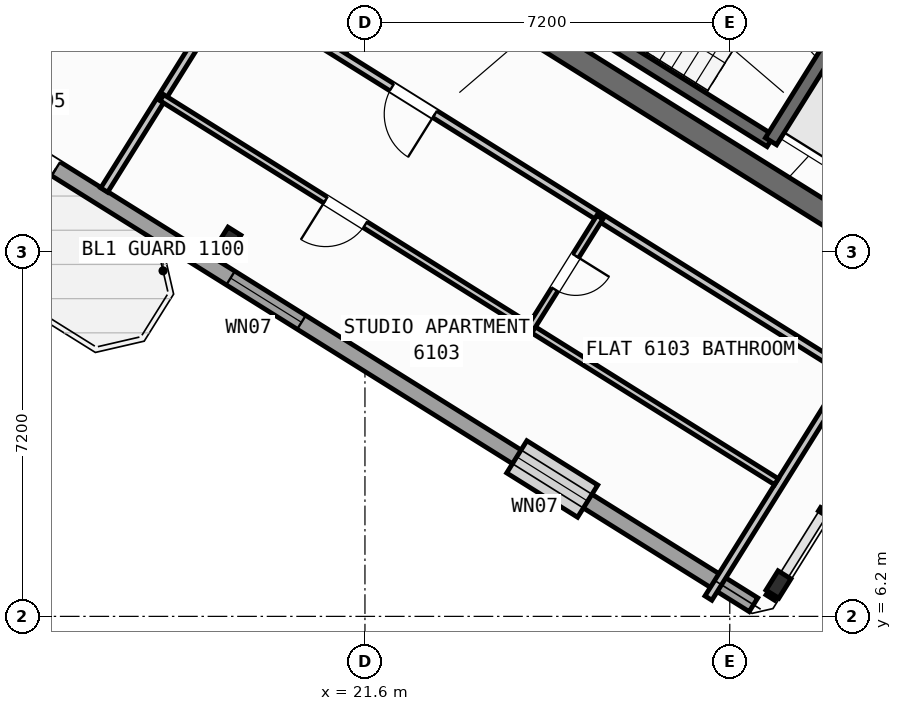
"""IFC4 building model, lengths in metres.
Left out: names, types, materials, properties, quantities, classifications, styles, units other than length and angle.
Written with IfcOpenShell. Run it as: python <this file> out.ifc"""

import sys

from ifc_helpers import new_model, si_unit, direction, frame, frame_2d, origin, origin_2d, place, context, subcontext, project, spatial, rectangle, i_section, extrude, source, transform, mapped, element, fill, save


model = new_model("IFC4")
c1 = context("Model", 3, precision=1e-05, world=origin(), true_north=direction((0.0, 1.0)))
c2 = subcontext(c1, "Body", "Model", "MODEL_VIEW")
j1 = project(units=[si_unit("LENGTHUNIT", "METRE"), si_unit("PLANEANGLEUNIT", "RADIAN")], contexts=[c1])
p1 = place(None, origin())
s1 = spatial("IfcSite", under=j1, at=p1, CompositionType="ELEMENT")
p2 = place(p1, origin())
s2 = spatial("IfcBuilding", under=s1, at=p2, CompositionType="ELEMENT")
p3 = place(p2, frame((0.0, 0.0, 242.1)))
s3 = spatial("IfcBuildingStorey", under=s2, at=p3, CompositionType="ELEMENT", Elevation=242.1)
p4 = place(p3, frame((33.324, 12.503, 0.0), z_axis=(0.0, 0.0, 1.0), x_axis=(-0.848043529849, 0.529926571782, 0.0)))
e1 = element("IfcWall", 1, at=p4, inside=s3, PredefinedType="SHEAR", context=c2, shape_type="SweptSolid", body=[
    extrude(rectangle(XDim=13.04, YDim=0.45, at=frame_2d((6.52, 0.0))), origin(), (0.0, 0.0, 1.0), 3.32),
])
m1 = source(origin(), c2, "Body", "SweptSolid", [
    extrude(i_section(OverallWidth=0.3, OverallDepth=0.45, WebThickness=0.014, FlangeThickness=0.026, at=origin_2d()), origin(), (0.0, 0.0, 1.0), 3.6),
])
for number, where, z_axis, x_axis in (
    (2, (29.761, 6.829, 0.0), (0.0, 0.0, 1.0), (-0.848, 0.53, 0.0)),
    (3, (18.906, 13.612, 0.0), (0.0, 0.0, 1.0), (-0.848, 0.53, 0.0)),
):
    element("IfcColumn", number, at=place(p3, frame(where, z_axis=z_axis, x_axis=x_axis)), inside=s3, PredefinedType="COLUMN", context=c2, shape_type="MappedRepresentation", body=[
        mapped(m1, transform((0.0, 0.0, 0.0), scale=1.0)),
    ])
p5 = place(p3, frame((29.268, 6.429, 0.0), z_axis=(0.0, 0.0, 1.0), x_axis=(-0.848049971435, 0.529916263149, 0.0)))
e4 = element("IfcWall", 4, at=p5, inside=s3, PredefinedType="STANDARD", context=c2, shape_type="SweptSolid", body=[
    extrude(rectangle(XDim=31.588, YDim=0.32, at=frame_2d((15.794, 0.0))), origin(), (0.0, 0.0, 1.0), 3.32),
])
p6 = place(p5, frame((16.235, 0.0, 0.0)))
e5 = element("IfcOpeningElement", 5, at=p6, cuts=e4, PredefinedType="OPENING", context=c2, shape_type="SweptSolid", body=[
    extrude(rectangle(XDim=1.2, YDim=2.15, at=frame_2d((0.6, 1.075))), frame((0.0, 0.17, 0.0), z_axis=(0.0, -1.0, 0.0), x_axis=(1.0, 0.0, 0.0)), (0.0, 0.0, 1.0), 0.34),
])
p7 = place(p5, frame((3.859, 0.0, 0.9)))
e6 = element("IfcOpeningElement", 6, at=p7, cuts=e4, PredefinedType="OPENING", context=c2, shape_type="SweptSolid", body=[
    extrude(rectangle(XDim=1.65, YDim=1.45, at=frame_2d((0.825, 0.725))), frame((0.0, 0.17, 0.0), z_axis=(0.0, -1.0, 0.0), x_axis=(1.0, 0.0, 0.0)), (0.0, 0.0, 1.0), 0.34),
])
p8 = place(p5, frame((10.519, 0.0, 0.9)))
e7 = element("IfcOpeningElement", 7, at=p8, cuts=e4, PredefinedType="OPENING", context=c2, shape_type="SweptSolid", body=[
    extrude(rectangle(XDim=1.65, YDim=1.45, at=frame_2d((0.825, 0.725))), frame((0.0, 0.17, 0.0), z_axis=(0.0, -1.0, 0.0), x_axis=(1.0, 0.0, 0.0)), (0.0, 0.0, 1.0), 0.34),
])
p9 = place(p5, frame((19.182, 0.0, 1.0)))
e8 = element("IfcOpeningElement", 8, at=p9, cuts=e4, PredefinedType="OPENING", context=c2, shape_type="SweptSolid", body=[
    extrude(rectangle(XDim=0.9, YDim=1.25, at=frame_2d((0.45, 0.625))), frame((0.0, 0.17, 0.0), z_axis=(0.0, -1.0, 0.0), x_axis=(1.0, 0.0, 0.0)), (0.0, 0.0, 1.0), 0.34),
])
p10 = place(p5, frame((22.524, 0.0, 1.0)))
e9 = element("IfcOpeningElement", 9, at=p10, cuts=e4, PredefinedType="OPENING", context=c2, shape_type="SweptSolid", body=[
    extrude(rectangle(XDim=0.9, YDim=1.25, at=frame_2d((0.45, 0.625))), frame((0.0, 0.17, 0.0), z_axis=(0.0, -1.0, 0.0), x_axis=(1.0, 0.0, 0.0)), (0.0, 0.0, 1.0), 0.34),
])
p11 = place(p5, frame((25.658, 0.0, 0.9)))
e10 = element("IfcOpeningElement", 10, at=p11, cuts=e4, PredefinedType="OPENING", context=c2, shape_type="SweptSolid", body=[
    extrude(rectangle(XDim=1.65, YDim=1.45, at=frame_2d((0.825, 0.725))), frame((0.0, 0.17, 0.0), z_axis=(0.0, -1.0, 0.0), x_axis=(1.0, 0.0, 0.0)), (0.0, 0.0, 1.0), 0.34),
])
p12 = place(p5, frame((29.278, 0.0, 0.9)))
e11 = element("IfcOpeningElement", 11, at=p12, cuts=e4, PredefinedType="OPENING", context=c2, shape_type="SweptSolid", body=[
    extrude(rectangle(XDim=1.35, YDim=1.45, at=frame_2d((0.675, 0.725))), frame((0.0, 0.17, 0.0), z_axis=(0.0, -1.0, 0.0), x_axis=(1.0, 0.0, 0.0)), (0.0, 0.0, 1.0), 0.34),
])
p13 = place(p3, frame((29.605, 15.581, 0.0), z_axis=(0.0, 0.0, 1.0), x_axis=(-0.848036911448, 0.529937163087, 0.0)))
e12 = element("IfcWall", 12, at=p13, inside=s3, PredefinedType="SHEAR", context=c2, shape_type="SweptSolid", body=[
    extrude(rectangle(XDim=7.46, YDim=0.26, at=frame_2d((3.73, 0.0))), origin(), (0.0, 0.0, 1.0), 3.32),
])
p14 = place(p3, frame((31.288, 18.256, 0.0), z_axis=(0.0, 0.0, 1.0), x_axis=(-0.529943379326, -0.848033026897, 0.0)))
e13 = element("IfcWall", 13, at=p14, inside=s3, PredefinedType="SHEAR", context=c2, shape_type="SweptSolid", body=[
    extrude(rectangle(XDim=3.16, YDim=0.26, at=frame_2d((1.58, 0.0))), origin(), (0.0, 0.0, 1.0), 3.32),
])
p15 = place(p3, frame((21.206, 17.292, 0.0), z_axis=(0.0, 0.0, 1.0), x_axis=(-0.848050851465, 0.529914854792, 0.0)))
e14 = element("IfcWall", 14, at=p15, inside=s3, PredefinedType="PARTITIONING", context=c2, shape_type="SweptSolid", body=[
    extrude(rectangle(XDim=2.61, YDim=0.16, at=frame_2d((1.305, 0.0))), origin(), (0.0, 0.0, 1.0), 3.31),
])
p16 = place(p3, frame((21.938, 23.391, 0.0), z_axis=(0.0, 0.0, 1.0), x_axis=(-0.529924725692, -0.848044683434, 0.0)))
e15 = element("IfcWall", 15, at=p16, inside=s3, PredefinedType="PARTITIONING", context=c2, shape_type="SweptSolid", body=[
    extrude(rectangle(XDim=10.35, YDim=0.16, at=frame_2d((5.175, 0.0))), origin(), (0.0, 0.0, 1.0), 3.31),
])
p17 = place(p3, frame((19.529, 24.896, 0.0), z_axis=(0.0, 0.0, 1.0), x_axis=(-0.529914125013, -0.848051307476, 0.0)))
e16 = element("IfcWall", 16, at=p17, inside=s3, PredefinedType="PARTITIONING", context=c2, shape_type="SweptSolid", body=[
    extrude(rectangle(XDim=10.35, YDim=0.16, at=frame_2d((5.175, 0.0))), origin(), (0.0, 0.0, 1.0), 3.31),
])
p18 = place(p3, frame((32.164, 10.374, 0.0), z_axis=(0.0, 0.0, 1.0), x_axis=(-0.848044107957, 0.529925646633, 0.0)))
e17 = element("IfcWall", 17, at=p18, inside=s3, PredefinedType="PARTITIONING", context=c2, shape_type="SweptSolid", body=[
    extrude(rectangle(XDim=15.57, YDim=0.16, at=frame_2d((7.785, 0.0))), origin(), (0.0, 0.0, 1.0), 3.31),
])
p19 = place(p18, frame((10.83, 0.0, 0.0)))
e18 = element("IfcOpeningElement", 18, at=p19, cuts=e17, PredefinedType="OPENING", context=c2, shape_type="SweptSolid", body=[
    extrude(rectangle(XDim=1.0, YDim=2.1, at=frame_2d((0.5, 1.05))), frame((0.0, 0.09, 0.0), z_axis=(0.0, -1.0, 0.0), x_axis=(1.0, 0.0, 0.0)), (0.0, 0.0, 1.0), 0.18),
])
p20 = place(p3, frame((31.282, 11.208, 0.0), z_axis=(0.0, 0.0, 1.0), x_axis=(-0.529938869374, -0.84803584519, 0.0)))
e19 = element("IfcWall", 19, at=p20, inside=s3, PredefinedType="PARTITIONING", context=c2, shape_type="SweptSolid", body=[
    extrude(rectangle(XDim=5.48, YDim=0.16, at=frame_2d((2.74, 0.0))), origin(), (0.0, 0.0, 1.0), 3.31),
])
p21 = place(p3, frame((29.72, 8.859, 0.0), z_axis=(0.0, 0.0, 1.0), x_axis=(-0.848049134363, 0.529917602752, 0.0)))
e20 = element("IfcWall", 20, at=p21, inside=s3, PredefinedType="PLUMBINGWALL", context=c2, shape_type="SweptSolid", body=[
    extrude(rectangle(XDim=14.3, YDim=0.14, at=frame_2d((7.15, 0.0))), origin(), (0.0, 0.0, 1.0), 3.31),
])
p22 = place(p21, frame((9.57, 0.0, 0.0)))
e21 = element("IfcOpeningElement", 21, at=p22, cuts=e20, PredefinedType="OPENING", context=c2, shape_type="SweptSolid", body=[
    extrude(rectangle(XDim=0.92, YDim=2.08, at=frame_2d((0.46, 1.04))), frame((0.0, 0.08, 0.0), z_axis=(0.0, -1.0, 0.0), x_axis=(1.0, 0.0, 0.0)), (0.0, 0.0, 1.0), 0.16),
])
p23 = place(p3, frame((26.237, 14.078, 0.0), z_axis=(0.0, 0.0, 1.0), x_axis=(-0.52995640672, -0.848024885824, 0.0)))
e22 = element("IfcWall", 22, at=p23, inside=s3, PredefinedType="PLUMBINGWALL", context=c2, shape_type="SweptSolid", body=[
    extrude(rectangle(XDim=2.58, YDim=0.14, at=frame_2d((1.29, 0.0))), origin(), (0.0, 0.0, 1.0), 3.31),
])
p24 = place(p23, frame((0.9, 0.0, 0.0)))
e23 = element("IfcOpeningElement", 23, at=p24, cuts=e22, PredefinedType="OPENING", context=c2, shape_type="SweptSolid", body=[
    extrude(rectangle(XDim=0.78, YDim=2.05, at=frame_2d((0.39, 1.025))), frame((0.0, 0.08, 0.0), z_axis=(0.0, -1.0, 0.0), x_axis=(1.0, 0.0, 0.0)), (0.0, 0.0, 1.0), 0.16),
])
m2 = source(origin(), c2, "Body", "SweptSolid", [
    extrude(rectangle(XDim=1.2, YDim=2.15, at=frame_2d((0.6, 1.075))), frame((0.0, 0.025, 0.0), z_axis=(0.0, -1.0, 0.0), x_axis=(1.0, 0.0, 0.0)), (0.0, 0.0, 1.0), 0.05),
])
p25 = place(p6, origin())
e24 = element("IfcDoor", 24, at=p25, inside=s3, OperationType="SINGLE_SWING_LEFT", PredefinedType="DOOR", context=c2, shape_type="MappedRepresentation", body=[
    mapped(m2, transform((0.0, 0.0, 0.0), scale=1.0)),
])
fill(e5, e24)
m3 = source(origin(), c2, "Body", "SweptSolid", [
    extrude(rectangle(XDim=1.65, YDim=1.45, at=frame_2d((0.825, 0.725))), frame((0.0, 0.03, 0.0), z_axis=(0.0, -1.0, 0.0), x_axis=(1.0, 0.0, 0.0)), (0.0, 0.0, 1.0), 0.06),
])
p26 = place(p7, origin())
e25 = element("IfcWindow", 25, at=p26, inside=s3, PartitioningType="SINGLE_PANEL", PredefinedType="WINDOW", context=c2, shape_type="MappedRepresentation", body=[
    mapped(m3, transform((0.0, 0.0, 0.0), scale=1.0)),
])
fill(e6, e25)
p27 = place(p8, origin())
e26 = element("IfcWindow", 26, at=p27, inside=s3, PartitioningType="SINGLE_PANEL", PredefinedType="WINDOW", context=c2, shape_type="MappedRepresentation", body=[
    mapped(m3, transform((0.0, 0.0, 0.0), scale=1.0)),
])
fill(e7, e26)
m4 = source(origin(), c2, "Body", "SweptSolid", [
    extrude(rectangle(XDim=1.0, YDim=2.1, at=frame_2d((0.5, 1.05))), frame((0.0, 0.025, 0.0), z_axis=(0.0, -1.0, 0.0), x_axis=(1.0, 0.0, 0.0)), (0.0, 0.0, 1.0), 0.05),
])
p28 = place(p19, origin())
e27 = element("IfcDoor", 27, at=p28, inside=s3, OperationType="SINGLE_SWING_LEFT", PredefinedType="DOOR", context=c2, shape_type="MappedRepresentation", body=[
    mapped(m4, transform((0.0, 0.0, 0.0), scale=1.0)),
])
fill(e18, e27)
m5 = source(origin(), c2, "Body", "SweptSolid", [
    extrude(rectangle(XDim=0.92, YDim=2.08, at=frame_2d((0.46, 1.04))), frame((0.0, 0.025, 0.0), z_axis=(0.0, -1.0, 0.0), x_axis=(1.0, 0.0, 0.0)), (0.0, 0.0, 1.0), 0.05),
])
p29 = place(p22, origin())
e28 = element("IfcDoor", 28, at=p29, inside=s3, OperationType="SINGLE_SWING_RIGHT", PredefinedType="DOOR", context=c2, shape_type="MappedRepresentation", body=[
    mapped(m5, transform((0.0, 0.0, 0.0), scale=1.0)),
])
fill(e21, e28)
m6 = source(origin(), c2, "Body", "SweptSolid", [
    extrude(rectangle(XDim=0.78, YDim=2.05, at=frame_2d((0.39, 1.025))), frame((0.0, 0.025, 0.0), z_axis=(0.0, -1.0, 0.0), x_axis=(1.0, 0.0, 0.0)), (0.0, 0.0, 1.0), 0.05),
])
p30 = place(p24, origin())
e29 = element("IfcDoor", 29, at=p30, inside=s3, OperationType="SINGLE_SWING_LEFT", PredefinedType="DOOR", context=c2, shape_type="MappedRepresentation", body=[
    mapped(m6, transform((0.0, 0.0, 0.0), scale=1.0)),
])
fill(e23, e29)
save(model, sys.argv[1])
